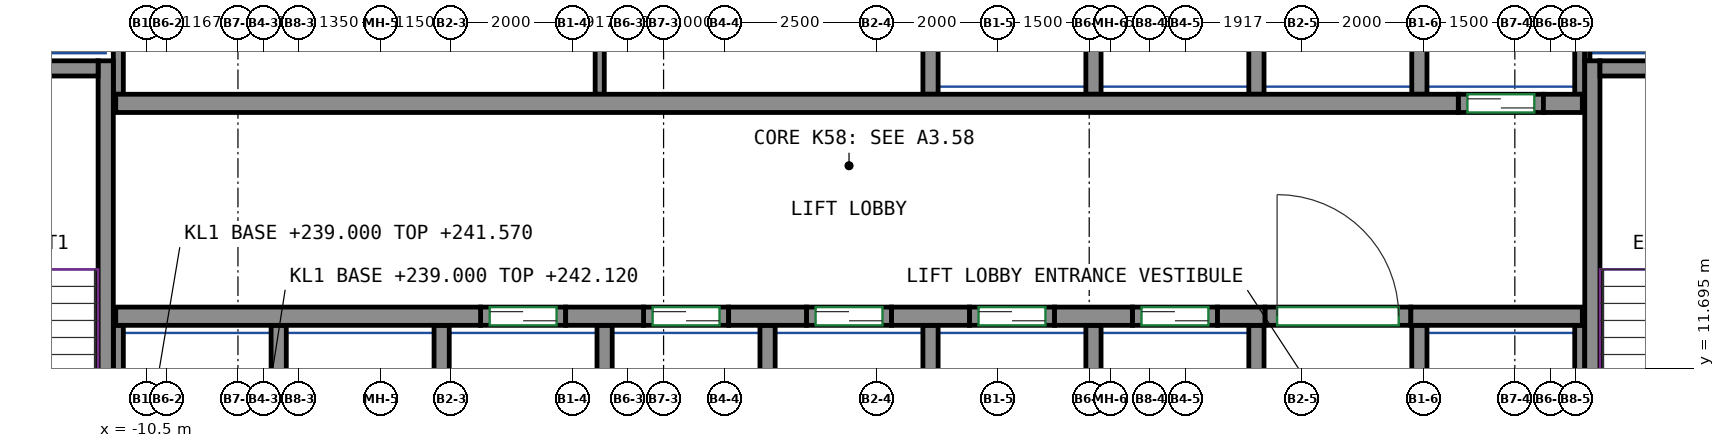
"""IFC4 building model, lengths in metres.
Left out: names, types, materials, properties, quantities, classifications, styles, units other than length and angle.
Written with IfcOpenShell. Run it as: python <this file> out.ifc"""

import sys

from ifc_helpers import new_model, si_unit, direction, frame, frame_2d, origin, place, context, subcontext, project, spatial, rectangle, extrude, source, transform, mapped, element, fill, save


model = new_model("IFC4")
c1 = context("Model", 3, precision=1e-05, world=origin(), true_north=direction((0.0, 1.0)))
c2 = subcontext(c1, "Body", "Model", "MODEL_VIEW")
j1 = project(units=[si_unit("LENGTHUNIT", "METRE"), si_unit("PLANEANGLEUNIT", "RADIAN")], contexts=[c1])
p1 = place(None, origin())
s1 = spatial("IfcSite", under=j1, at=p1, CompositionType="ELEMENT")
p2 = place(p1, origin())
s2 = spatial("IfcBuilding", under=s1, at=p2, CompositionType="ELEMENT")
p3 = place(p2, frame((0.0, 0.0, 239.0)))
s3 = spatial("IfcBuildingStorey", under=s2, at=p3, CompositionType="ELEMENT", Elevation=239.0)
m1 = source(origin(), c2, "Body", "SweptSolid", [
    extrude(rectangle(XDim=7.75, YDim=0.25, at=frame_2d((3.875, 0.0))), origin(), (0.0, 0.0, 1.0), 3.12),
])
p4 = place(p3, frame((-11.175, 9.0, 0.0), z_axis=(0.0, 0.0, 1.0), x_axis=(0.0, 1.0, 0.0)))
e1 = element("IfcWall", 1, at=p4, inside=s3, PredefinedType="SHEAR", context=c2, shape_type="MappedRepresentation", body=[
    mapped(m1, transform((0.0, 0.0, 0.0))),
])
m2 = source(origin(), c2, "Body", "SweptSolid", [
    extrude(rectangle(XDim=3.7, YDim=0.25, at=frame_2d((1.85, 0.0))), origin(), (0.0, 0.0, 1.0), 3.12),
])
p5 = place(p3, frame((-15.0, 16.625, 0.0), z_axis=(0.0, 0.0, 1.0), x_axis=(1.0, 0.0, 0.0)))
e2 = element("IfcWall", 2, at=p5, inside=s3, PredefinedType="SHEAR", context=c2, shape_type="MappedRepresentation", body=[
    mapped(m2, transform((0.0, 0.0, 0.0))),
])
p6 = place(p3, frame((13.275, 9.0, 0.0), z_axis=(0.0, 0.0, 1.0), x_axis=(0.0, 1.0, 0.0)))
e3 = element("IfcWall", 3, at=p6, inside=s3, PredefinedType="SHEAR", context=c2, shape_type="MappedRepresentation", body=[
    mapped(m1, transform((0.0, 0.0, 0.0))),
])
m3 = source(origin(), c2, "Body", "SweptSolid", [
    extrude(rectangle(XDim=3.7, YDim=0.25, at=frame_2d((1.85, 0.0))), origin(), (0.0, 0.0, 1.0), 3.12),
])
p7 = place(p3, frame((13.4, 16.625, 0.0), z_axis=(0.0, 0.0, 1.0), x_axis=(1.0, 0.0, 0.0)))
e4 = element("IfcWall", 4, at=p7, inside=s3, PredefinedType="SHEAR", context=c2, shape_type="MappedRepresentation", body=[
    mapped(m3, transform((0.0, 0.0, 0.0))),
])
m4 = source(origin(), c2, "Body", "SweptSolid", [
    extrude(rectangle(XDim=6.0, YDim=0.3, at=frame_2d((3.0, 0.0))), origin(), (0.0, 0.0, 1.0), 3.12),
])
p8 = place(p3, frame((-11.01, 12.55, 0.0), z_axis=(0.0, 0.0, 1.0), x_axis=(1.0, 0.0, 0.0)))
e5 = element("IfcWall", 5, at=p8, inside=s3, PredefinedType="SHEAR", context=c2, shape_type="MappedRepresentation", body=[
    mapped(m4, transform((0.0, 0.0, 0.0))),
])
m5 = source(origin(), c2, "Body", "SweptSolid", [
    extrude(rectangle(XDim=1.28, YDim=0.3, at=frame_2d((0.64, 0.0))), origin(), (0.0, 0.0, 1.0), 3.12),
])
for number, where, z_axis, x_axis in (
    (6, (-3.61, 12.55, 0.0), (0.0, 0.0, 1.0), (1.0, 0.0, 0.0)),
    (7, (-0.93, 12.55, 0.0), (0.0, 0.0, 1.0), (1.0, 0.0, 0.0)),
    (8, (1.75, 12.55, 0.0), (0.0, 0.0, 1.0), (1.0, 0.0, 0.0)),
    (9, (4.43, 12.55, 0.0), (0.0, 0.0, 1.0), (1.0, 0.0, 0.0)),
):
    element("IfcWall", number, at=place(p3, frame(where, z_axis=z_axis, x_axis=x_axis)), inside=s3, PredefinedType="SHEAR", context=c2, shape_type="MappedRepresentation", body=[
        mapped(m5, transform((0.0, 0.0, 0.0))),
    ])
m6 = source(origin(), c2, "Body", "SweptSolid", [
    extrude(rectangle(XDim=0.78, YDim=0.3, at=frame_2d((0.39, 0.0))), origin(), (0.0, 0.0, 1.0), 3.12),
])
p9 = place(p3, frame((7.11, 12.55, 0.0), z_axis=(0.0, 0.0, 1.0), x_axis=(1.0, 0.0, 0.0)))
e10 = element("IfcWall", 10, at=p9, inside=s3, PredefinedType="SHEAR", context=c2, shape_type="MappedRepresentation", body=[
    mapped(m6, transform((0.0, 0.0, 0.0))),
])
m7 = source(origin(), c2, "Body", "SweptSolid", [
    extrude(rectangle(XDim=2.82, YDim=0.3, at=frame_2d((1.41, 0.0))), origin(), (0.0, 0.0, 1.0), 3.12),
])
p10 = place(p3, frame((10.29, 12.55, 0.0), z_axis=(0.0, 0.0, 1.0), x_axis=(1.0, 0.0, 0.0)))
e11 = element("IfcWall", 11, at=p10, inside=s3, PredefinedType="SHEAR", context=c2, shape_type="MappedRepresentation", body=[
    mapped(m7, transform((0.0, 0.0, 0.0))),
])
m8 = source(origin(), c2, "Body", "SweptSolid", [
    extrude(rectangle(XDim=22.08, YDim=0.3, at=frame_2d((11.04, 0.0))), origin(), (0.0, 0.0, 1.0), 3.12),
])
p11 = place(p3, frame((-11.01, 16.05, 0.0), z_axis=(0.0, 0.0, 1.0), x_axis=(1.0, 0.0, 0.0)))
e12 = element("IfcWall", 12, at=p11, inside=s3, PredefinedType="SHEAR", context=c2, shape_type="MappedRepresentation", body=[
    mapped(m8, transform((0.0, 0.0, 0.0))),
])
m9 = source(origin(), c2, "Body", "SweptSolid", [
    extrude(rectangle(XDim=0.64, YDim=0.3, at=frame_2d((0.32, 0.0))), origin(), (0.0, 0.0, 1.0), 3.12),
])
p12 = place(p3, frame((12.47, 16.05, 0.0), z_axis=(0.0, 0.0, 1.0), x_axis=(1.0, 0.0, 0.0)))
e13 = element("IfcWall", 13, at=p12, inside=s3, PredefinedType="SHEAR", context=c2, shape_type="MappedRepresentation", body=[
    mapped(m9, transform((0.0, 0.0, 0.0))),
])
m10 = source(origin(), c2, "Body", "SweptSolid", [
    extrude(rectangle(XDim=1.4, YDim=0.3, at=frame_2d((0.7, 0.0))), origin(), (0.0, 0.0, 1.0), 3.12),
])
p13 = place(p3, frame((-5.01, 12.55, 0.0), z_axis=(0.0, 0.0, 1.0), x_axis=(1.0, 0.0, 0.0)))
e14 = element("IfcWall", 14, at=p13, inside=s3, PredefinedType="PARTITIONING", context=c2, shape_type="MappedRepresentation", body=[
    mapped(m10, transform((0.0, 0.0, 0.0))),
])
p14 = place(p13, frame((0.15, 0.0, 0.0)))
e15 = element("IfcOpeningElement", 15, at=p14, cuts=e14, PredefinedType="OPENING", context=c2, shape_type="SweptSolid", body=[
    extrude(rectangle(XDim=1.1, YDim=2.1, at=frame_2d((0.55, 1.05))), frame((0.0, 0.16, 0.0), z_axis=(0.0, -1.0, 0.0), x_axis=(1.0, 0.0, 0.0)), (0.0, 0.0, 1.0), 0.32),
])
m11 = source(origin(), c2, "Body", "SweptSolid", [
    extrude(rectangle(XDim=1.4, YDim=0.3, at=frame_2d((0.7, 0.0))), origin(), (0.0, 0.0, 1.0), 3.12),
])
p15 = place(p3, frame((-2.33, 12.55, 0.0), z_axis=(0.0, 0.0, 1.0), x_axis=(1.0, 0.0, 0.0)))
e16 = element("IfcWall", 16, at=p15, inside=s3, PredefinedType="PARTITIONING", context=c2, shape_type="MappedRepresentation", body=[
    mapped(m11, transform((0.0, 0.0, 0.0))),
])
p16 = place(p15, frame((0.15, 0.0, 0.0)))
e17 = element("IfcOpeningElement", 17, at=p16, cuts=e16, PredefinedType="OPENING", context=c2, shape_type="SweptSolid", body=[
    extrude(rectangle(XDim=1.1, YDim=2.1, at=frame_2d((0.55, 1.05))), frame((0.0, 0.16, 0.0), z_axis=(0.0, -1.0, 0.0), x_axis=(1.0, 0.0, 0.0)), (0.0, 0.0, 1.0), 0.32),
])
p17 = place(p3, frame((0.35, 12.55, 0.0), z_axis=(0.0, 0.0, 1.0), x_axis=(1.0, 0.0, 0.0)))
e18 = element("IfcWall", 18, at=p17, inside=s3, PredefinedType="PARTITIONING", context=c2, shape_type="MappedRepresentation", body=[
    mapped(m10, transform((0.0, 0.0, 0.0))),
])
p18 = place(p17, frame((0.15, 0.0, 0.0)))
e19 = element("IfcOpeningElement", 19, at=p18, cuts=e18, PredefinedType="OPENING", context=c2, shape_type="SweptSolid", body=[
    extrude(rectangle(XDim=1.1, YDim=2.1, at=frame_2d((0.55, 1.05))), frame((0.0, 0.16, 0.0), z_axis=(0.0, -1.0, 0.0), x_axis=(1.0, 0.0, 0.0)), (0.0, 0.0, 1.0), 0.32),
])
p19 = place(p3, frame((3.03, 12.55, 0.0), z_axis=(0.0, 0.0, 1.0), x_axis=(1.0, 0.0, 0.0)))
e20 = element("IfcWall", 20, at=p19, inside=s3, PredefinedType="PARTITIONING", context=c2, shape_type="MappedRepresentation", body=[
    mapped(m10, transform((0.0, 0.0, 0.0))),
])
p20 = place(p19, frame((0.15, 0.0, 0.0)))
e21 = element("IfcOpeningElement", 21, at=p20, cuts=e20, PredefinedType="OPENING", context=c2, shape_type="SweptSolid", body=[
    extrude(rectangle(XDim=1.1, YDim=2.1, at=frame_2d((0.55, 1.05))), frame((0.0, 0.16, 0.0), z_axis=(0.0, -1.0, 0.0), x_axis=(1.0, 0.0, 0.0)), (0.0, 0.0, 1.0), 0.32),
])
p21 = place(p3, frame((5.71, 12.55, 0.0), z_axis=(0.0, 0.0, 1.0), x_axis=(1.0, 0.0, 0.0)))
e22 = element("IfcWall", 22, at=p21, inside=s3, PredefinedType="PARTITIONING", context=c2, shape_type="MappedRepresentation", body=[
    mapped(m11, transform((0.0, 0.0, 0.0))),
])
p22 = place(p21, frame((0.15, 0.0, 0.0)))
e23 = element("IfcOpeningElement", 23, at=p22, cuts=e22, PredefinedType="OPENING", context=c2, shape_type="SweptSolid", body=[
    extrude(rectangle(XDim=1.1, YDim=2.1, at=frame_2d((0.55, 1.05))), frame((0.0, 0.16, 0.0), z_axis=(0.0, -1.0, 0.0), x_axis=(1.0, 0.0, 0.0)), (0.0, 0.0, 1.0), 0.32),
])
p23 = place(p3, frame((11.07, 16.05, 0.0), z_axis=(0.0, 0.0, 1.0), x_axis=(1.0, 0.0, 0.0)))
e24 = element("IfcWall", 24, at=p23, inside=s3, PredefinedType="PARTITIONING", context=c2, shape_type="MappedRepresentation", body=[
    mapped(m10, transform((0.0, 0.0, 0.0))),
])
p24 = place(p23, frame((0.15, 0.0, 0.0)))
e25 = element("IfcOpeningElement", 25, at=p24, cuts=e24, PredefinedType="OPENING", context=c2, shape_type="SweptSolid", body=[
    extrude(rectangle(XDim=1.1, YDim=2.1, at=frame_2d((0.55, 1.05))), frame((0.0, 0.16, 0.0), z_axis=(0.0, -1.0, 0.0), x_axis=(1.0, 0.0, 0.0)), (0.0, 0.0, 1.0), 0.32),
])
m12 = source(origin(), c2, "Body", "SweptSolid", [
    extrude(rectangle(XDim=2.4, YDim=0.3, at=frame_2d((1.2, 0.0))), origin(), (0.0, 0.0, 1.0), 3.12),
])
p25 = place(p3, frame((7.89, 12.55, 0.0), z_axis=(0.0, 0.0, 1.0), x_axis=(1.0, 0.0, 0.0)))
e26 = element("IfcWall", 26, at=p25, inside=s3, PredefinedType="PARTITIONING", context=c2, shape_type="MappedRepresentation", body=[
    mapped(m12, transform((0.0, 0.0, 0.0))),
])
p26 = place(p25, frame((0.2, 0.0, 0.0)))
e27 = element("IfcOpeningElement", 27, at=p26, cuts=e26, PredefinedType="OPENING", context=c2, shape_type="SweptSolid", body=[
    extrude(rectangle(XDim=2.0, YDim=2.1, at=frame_2d((1.0, 1.05))), frame((0.0, 0.16, 0.0), z_axis=(0.0, -1.0, 0.0), x_axis=(1.0, 0.0, 0.0)), (0.0, 0.0, 1.0), 0.32),
])
m13 = source(origin(), c2, "Body", "SweptSolid", [
    extrude(rectangle(XDim=3.275, YDim=0.165, at=frame_2d((1.638, 0.0))), origin(), (0.0, 0.0, 1.0), 3.12),
])
p27 = place(p3, frame((13.067, 16.2, 0.0), z_axis=(0.0, 0.0, 1.0), x_axis=(0.0, 1.0, 0.0)))
e28 = element("IfcWall", 28, at=p27, inside=s3, PredefinedType="PARTITIONING", context=c2, shape_type="MappedRepresentation", body=[
    mapped(m13, transform((0.0, 0.0, 0.0))),
])
m14 = source(origin(), c2, "Body", "SweptSolid", [
    extrude(rectangle(XDim=4.8, YDim=0.165, at=frame_2d((2.4, 0.0))), origin(), (0.0, 0.0, 1.0), 3.12),
])
p28 = place(p3, frame((-10.968, 16.2, 0.0), z_axis=(0.0, 0.0, 1.0), x_axis=(0.0, 1.0, 0.0)))
e29 = element("IfcWall", 29, at=p28, inside=s3, PredefinedType="PARTITIONING", context=c2, shape_type="MappedRepresentation", body=[
    mapped(m14, transform((0.0, 0.0, 0.0))),
])
m15 = source(origin(), c2, "Body", "SweptSolid", [
    extrude(rectangle(XDim=3.275, YDim=0.25, at=frame_2d((1.638, 0.0))), origin(), (0.0, 0.0, 1.0), 3.12),
])
p29 = place(p3, frame((10.43, 16.2, 0.0), z_axis=(0.0, 0.0, 1.0), x_axis=(0.0, 1.0, 0.0)))
e30 = element("IfcWall", 30, at=p29, inside=s3, PredefinedType="PARTITIONING", context=c2, shape_type="MappedRepresentation", body=[
    mapped(m15, transform((0.0, 0.0, 0.0))),
])
m16 = source(origin(), c2, "Body", "SweptSolid", [
    extrude(rectangle(XDim=2.725, YDim=0.085, at=frame_2d((1.363, 0.0))), origin(), (0.0, 0.0, 1.0), 3.12),
])
p30 = place(p3, frame((13.192, 16.75, 0.0), z_axis=(0.0, 0.0, 1.0), x_axis=(0.0, 1.0, 0.0)))
e31 = element("IfcWall", 31, at=p30, inside=s3, PredefinedType="PARTITIONING", context=c2, shape_type="MappedRepresentation", body=[
    mapped(m16, transform((0.0, 0.0, 0.0))),
])
for number, where, z_axis, x_axis in (
    (32, (2.39, 16.2, 0.0), (0.0, 0.0, 1.0), (0.0, 1.0, 0.0)),
    (33, (5.07, 16.2, 0.0), (0.0, 0.0, 1.0), (0.0, 1.0, 0.0)),
    (34, (7.75, 16.2, 0.0), (0.0, 0.0, 1.0), (0.0, 1.0, 0.0)),
):
    element("IfcWall", number, at=place(p3, frame(where, z_axis=z_axis, x_axis=x_axis)), inside=s3, PredefinedType="PARTITIONING", context=c2, shape_type="MappedRepresentation", body=[
        mapped(m15, transform((0.0, 0.0, 0.0))),
    ])
m17 = source(origin(), c2, "Body", "SweptSolid", [
    extrude(rectangle(XDim=3.4, YDim=0.25, at=frame_2d((1.7, 0.0))), origin(), (0.0, 0.0, 1.0), 3.12),
])
p31 = place(p3, frame((10.43, 9.0, 0.0), z_axis=(0.0, 0.0, 1.0), x_axis=(0.0, 1.0, 0.0)))
e35 = element("IfcWall", 35, at=p31, inside=s3, PredefinedType="PARTITIONING", context=c2, shape_type="MappedRepresentation", body=[
    mapped(m17, transform((0.0, 0.0, 0.0))),
])
m18 = source(origin(), c2, "Body", "SweptSolid", [
    extrude(rectangle(XDim=3.4, YDim=0.165, at=frame_2d((1.7, 0.0))), origin(), (0.0, 0.0, 1.0), 3.12),
])
p32 = place(p3, frame((13.067, 9.0, 0.0), z_axis=(0.0, 0.0, 1.0), x_axis=(0.0, 1.0, 0.0)))
e36 = element("IfcWall", 36, at=p32, inside=s3, PredefinedType="PARTITIONING", context=c2, shape_type="MappedRepresentation", body=[
    mapped(m18, transform((0.0, 0.0, 0.0))),
])
for number, where, z_axis, x_axis in (
    (37, (2.39, 9.0, 0.0), (0.0, 0.0, 1.0), (0.0, 1.0, 0.0)),
    (38, (5.07, 9.0, 0.0), (0.0, 0.0, 1.0), (0.0, 1.0, 0.0)),
    (39, (7.75, 9.0, 0.0), (0.0, 0.0, 1.0), (0.0, 1.0, 0.0)),
    (40, (-0.29, 9.0, 0.0), (0.0, 0.0, 1.0), (0.0, 1.0, 0.0)),
):
    element("IfcWall", number, at=place(p3, frame(where, z_axis=z_axis, x_axis=x_axis)), inside=s3, PredefinedType="PARTITIONING", context=c2, shape_type="MappedRepresentation", body=[
        mapped(m17, transform((0.0, 0.0, 0.0))),
    ])
p33 = place(p3, frame((-10.968, 9.0, 0.0), z_axis=(0.0, 0.0, 1.0), x_axis=(0.0, 1.0, 0.0)))
e41 = element("IfcWall", 41, at=p33, inside=s3, PredefinedType="PARTITIONING", context=c2, shape_type="MappedRepresentation", body=[
    mapped(m18, transform((0.0, 0.0, 0.0))),
])
for number, where, z_axis, x_axis in (
    (42, (-2.97, 9.0, 0.0), (0.0, 0.0, 1.0), (0.0, 1.0, 0.0)),
    (43, (-5.65, 9.0, 0.0), (0.0, 0.0, 1.0), (0.0, 1.0, 0.0)),
    (44, (-8.33, 9.0, 0.0), (0.0, 0.0, 1.0), (0.0, 1.0, 0.0)),
):
    element("IfcWall", number, at=place(p3, frame(where, z_axis=z_axis, x_axis=x_axis)), inside=s3, PredefinedType="PARTITIONING", context=c2, shape_type="MappedRepresentation", body=[
        mapped(m17, transform((0.0, 0.0, 0.0))),
    ])
m19 = source(origin(), c2, "Body", "SweptSolid", [
    extrude(rectangle(XDim=4.8, YDim=0.15, at=frame_2d((2.4, 0.0))), origin(), (0.0, 0.0, 1.0), 3.12),
])
p34 = place(p3, frame((-3.05, 16.2, 0.0), z_axis=(0.0, 0.0, 1.0), x_axis=(0.0, 1.0, 0.0)))
e45 = element("IfcWall", 45, at=p34, inside=s3, PredefinedType="PARTITIONING", context=c2, shape_type="MappedRepresentation", body=[
    mapped(m19, transform((0.0, 0.0, 0.0))),
])
p35 = place(p26, origin())
e46 = element("IfcDoor", 46, at=p35, inside=s3, OperationType="DOUBLE_DOOR_SINGLE_SWING", PredefinedType="DOOR", context=c2, shape_type="SweptSolid", body=[
    extrude(rectangle(XDim=2.0, YDim=2.1, at=frame_2d((1.0, 1.05))), frame((0.0, 0.025, 0.0), z_axis=(0.0, -1.0, 0.0), x_axis=(1.0, 0.0, 0.0)), (0.0, 0.0, 1.0), 0.05),
])
fill(e27, e46)
p36 = place(p14, origin())
e47 = element("IfcDoor", 47, at=p36, inside=s3, OperationType="DOUBLE_DOOR_SLIDING", PredefinedType="DOOR", context=c2, shape_type="SweptSolid", body=[
    extrude(rectangle(XDim=1.1, YDim=2.1, at=frame_2d((0.55, 1.05))), frame((0.0, 0.025, 0.0), z_axis=(0.0, -1.0, 0.0), x_axis=(1.0, 0.0, 0.0)), (0.0, 0.0, 1.0), 0.05),
])
fill(e15, e47)
p37 = place(p16, origin())
e48 = element("IfcDoor", 48, at=p37, inside=s3, OperationType="DOUBLE_DOOR_SLIDING", PredefinedType="DOOR", context=c2, shape_type="SweptSolid", body=[
    extrude(rectangle(XDim=1.1, YDim=2.1, at=frame_2d((0.55, 1.05))), frame((0.0, 0.025, 0.0), z_axis=(0.0, -1.0, 0.0), x_axis=(1.0, 0.0, 0.0)), (0.0, 0.0, 1.0), 0.05),
])
fill(e17, e48)
p38 = place(p18, origin())
e49 = element("IfcDoor", 49, at=p38, inside=s3, OperationType="DOUBLE_DOOR_SLIDING", PredefinedType="DOOR", context=c2, shape_type="SweptSolid", body=[
    extrude(rectangle(XDim=1.1, YDim=2.1, at=frame_2d((0.55, 1.05))), frame((0.0, 0.025, 0.0), z_axis=(0.0, -1.0, 0.0), x_axis=(1.0, 0.0, 0.0)), (0.0, 0.0, 1.0), 0.05),
])
fill(e19, e49)
p39 = place(p20, origin())
e50 = element("IfcDoor", 50, at=p39, inside=s3, OperationType="DOUBLE_DOOR_SLIDING", PredefinedType="DOOR", context=c2, shape_type="SweptSolid", body=[
    extrude(rectangle(XDim=1.1, YDim=2.1, at=frame_2d((0.55, 1.05))), frame((0.0, 0.025, 0.0), z_axis=(0.0, -1.0, 0.0), x_axis=(1.0, 0.0, 0.0)), (0.0, 0.0, 1.0), 0.05),
])
fill(e21, e50)
p40 = place(p22, origin())
e51 = element("IfcDoor", 51, at=p40, inside=s3, OperationType="DOUBLE_DOOR_SLIDING", PredefinedType="DOOR", context=c2, shape_type="SweptSolid", body=[
    extrude(rectangle(XDim=1.1, YDim=2.1, at=frame_2d((0.55, 1.05))), frame((0.0, 0.025, 0.0), z_axis=(0.0, -1.0, 0.0), x_axis=(1.0, 0.0, 0.0)), (0.0, 0.0, 1.0), 0.05),
])
fill(e23, e51)
p41 = place(p24, origin())
e52 = element("IfcDoor", 52, at=p41, inside=s3, OperationType="DOUBLE_DOOR_SLIDING", PredefinedType="DOOR", context=c2, shape_type="SweptSolid", body=[
    extrude(rectangle(XDim=1.1, YDim=2.1, at=frame_2d((0.55, 1.05))), frame((0.0, 0.025, 0.0), z_axis=(0.0, -1.0, 0.0), x_axis=(1.0, 0.0, 0.0)), (0.0, 0.0, 1.0), 0.05),
])
fill(e25, e52)
save(model, sys.argv[1])
